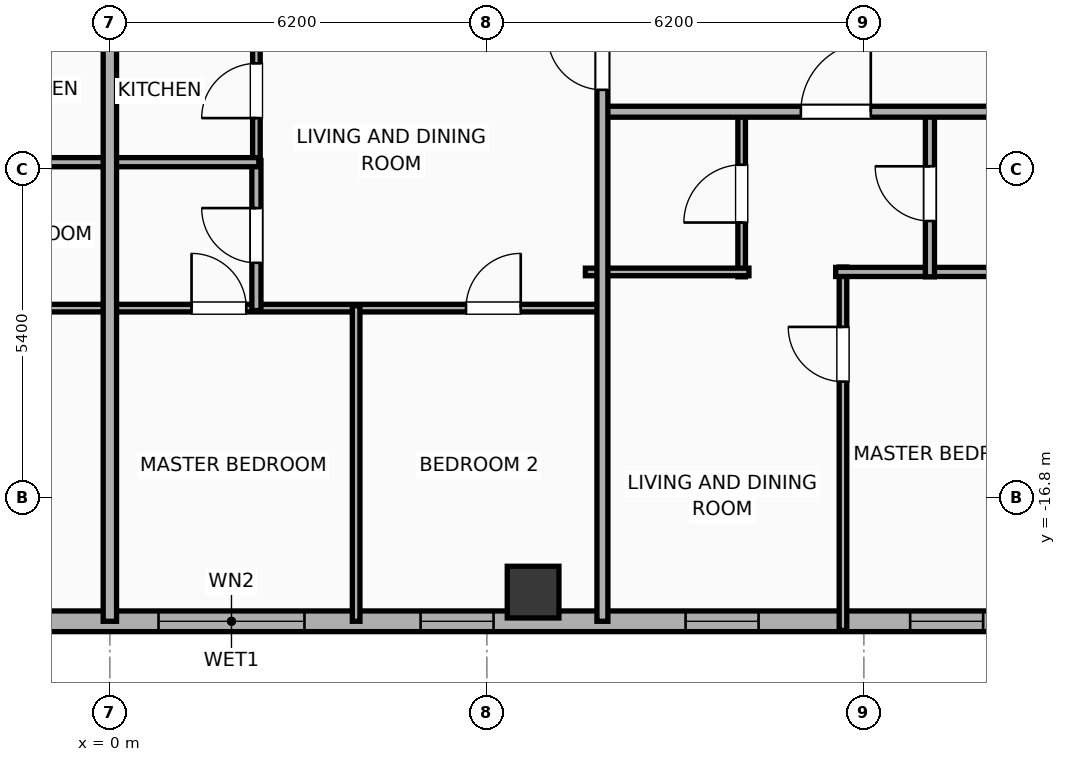
"""IFC4 building model, lengths in metres.
Left out: names, types, materials, properties, quantities, classifications, styles, units other than length and angle.
Written with IfcOpenShell. Run it as: python <this file> out.ifc"""

import sys

from ifc_helpers import new_model, si_unit, direction, frame, frame_2d, origin, origin_2d, place, context, subcontext, project, spatial, rectangle, hollow_rectangle, extrude, element, fill, save


model = new_model("IFC4")
c1 = context("Model", 3, precision=1e-05, world=origin(), true_north=direction((0.0, 1.0)))
c2 = subcontext(c1, "Body", "Model", "MODEL_VIEW")
j1 = project(units=[si_unit("LENGTHUNIT", "METRE"), si_unit("PLANEANGLEUNIT", "RADIAN")], contexts=[c1])
p1 = place(None, origin())
s1 = spatial("IfcSite", under=j1, at=p1, CompositionType="ELEMENT")
p2 = place(p1, origin())
s2 = spatial("IfcBuilding", under=s1, at=p2, CompositionType="ELEMENT")
p3 = place(p2, frame((0.0, 0.0, 239.2)))
s3 = spatial("IfcBuildingStorey", under=s2, at=p3, CompositionType="ELEMENT", Elevation=239.2)
p4 = place(p3, frame((6.96, -18.35, 0.0), z_axis=(0.0, 0.0, 1.0), x_axis=(1.0, 0.0, 0.0)))
e1 = element("IfcColumn", 1, at=p4, inside=s3, PredefinedType="COLUMN", context=c2, shape_type="SweptSolid", body=[
    extrude(hollow_rectangle(XDim=0.85, YDim=0.85, WallThickness=0.028, at=origin_2d()), origin(), (0.0, 0.0, 1.0), 3.9),
])
p5 = place(p3, frame((26.783, -18.83, 0.0), z_axis=(0.0, 0.0, 1.0), x_axis=(-1.0, 0.0, 0.0)))
e2 = element("IfcWall", 2, at=p5, inside=s3, PredefinedType="ELEMENTEDWALL", context=c2, shape_type="SweptSolid", body=[
    extrude(rectangle(XDim=49.566, YDim=0.34, at=frame_2d((24.783, 0.0))), origin(), (0.0, 0.0, 1.0), 3.65),
])
p6 = place(p5, frame((23.583, 0.0, 0.75)))
e3 = element("IfcOpeningElement", 3, at=p6, cuts=e2, PredefinedType="OPENING", context=c2, shape_type="SweptSolid", body=[
    extrude(rectangle(XDim=2.4, YDim=2.1, at=frame_2d((1.2, 1.05))), frame((0.0, 0.18, 0.0), z_axis=(0.0, -1.0, 0.0), x_axis=(1.0, 0.0, 0.0)), (0.0, 0.0, 1.0), 0.36),
])
p7 = place(p5, frame((41.756, 0.0, 0.75)))
e4 = element("IfcOpeningElement", 4, at=p7, cuts=e2, PredefinedType="OPENING", context=c2, shape_type="SweptSolid", body=[
    extrude(rectangle(XDim=2.4, YDim=2.1, at=frame_2d((1.2, 1.05))), frame((0.0, 0.18, 0.0), z_axis=(0.0, -1.0, 0.0), x_axis=(1.0, 0.0, 0.0)), (0.0, 0.0, 1.0), 0.36),
])
p8 = place(p5, frame((47.222, 0.0, 0.75)))
e5 = element("IfcOpeningElement", 5, at=p8, cuts=e2, PredefinedType="OPENING", context=c2, shape_type="SweptSolid", body=[
    extrude(rectangle(XDim=1.2, YDim=2.05, at=frame_2d((0.6, 1.025))), frame((0.0, 0.18, 0.0), z_axis=(0.0, -1.0, 0.0), x_axis=(1.0, 0.0, 0.0)), (0.0, 0.0, 1.0), 0.36),
])
p9 = place(p5, frame((45.263, 0.0, 0.75)))
e6 = element("IfcOpeningElement", 6, at=p9, cuts=e2, PredefinedType="OPENING", context=c2, shape_type="SweptSolid", body=[
    extrude(rectangle(XDim=1.2, YDim=2.05, at=frame_2d((0.6, 1.025))), frame((0.0, 0.18, 0.0), z_axis=(0.0, -1.0, 0.0), x_axis=(1.0, 0.0, 0.0)), (0.0, 0.0, 1.0), 0.36),
])
p10 = place(p5, frame((37.289, 0.0, 0.75)))
e7 = element("IfcOpeningElement", 7, at=p10, cuts=e2, PredefinedType="OPENING", context=c2, shape_type="SweptSolid", body=[
    extrude(rectangle(XDim=1.2, YDim=2.05, at=frame_2d((0.6, 1.025))), frame((0.0, 0.18, 0.0), z_axis=(0.0, -1.0, 0.0), x_axis=(1.0, 0.0, 0.0)), (0.0, 0.0, 1.0), 0.36),
])
p11 = place(p5, frame((16.115, 0.0, 0.75)))
e8 = element("IfcOpeningElement", 8, at=p11, cuts=e2, PredefinedType="OPENING", context=c2, shape_type="SweptSolid", body=[
    extrude(rectangle(XDim=1.2, YDim=2.05, at=frame_2d((0.6, 1.025))), frame((0.0, 0.18, 0.0), z_axis=(0.0, -1.0, 0.0), x_axis=(1.0, 0.0, 0.0)), (0.0, 0.0, 1.0), 0.36),
])
p12 = place(p5, frame((12.422, 0.0, 0.75)))
e9 = element("IfcOpeningElement", 9, at=p12, cuts=e2, PredefinedType="OPENING", context=c2, shape_type="SweptSolid", body=[
    extrude(rectangle(XDim=1.2, YDim=2.05, at=frame_2d((0.6, 1.025))), frame((0.0, 0.18, 0.0), z_axis=(0.0, -1.0, 0.0), x_axis=(1.0, 0.0, 0.0)), (0.0, 0.0, 1.0), 0.36),
])
p13 = place(p5, frame((8.01, 0.0, 0.75)))
e10 = element("IfcOpeningElement", 10, at=p13, cuts=e2, PredefinedType="OPENING", context=c2, shape_type="SweptSolid", body=[
    extrude(rectangle(XDim=1.2, YDim=2.05, at=frame_2d((0.6, 1.025))), frame((0.0, 0.18, 0.0), z_axis=(0.0, -1.0, 0.0), x_axis=(1.0, 0.0, 0.0)), (0.0, 0.0, 1.0), 0.36),
])
p14 = place(p5, frame((5.037, 0.0, 0.75)))
e11 = element("IfcOpeningElement", 11, at=p14, cuts=e2, PredefinedType="OPENING", context=c2, shape_type="SweptSolid", body=[
    extrude(rectangle(XDim=1.2, YDim=2.05, at=frame_2d((0.6, 1.025))), frame((0.0, 0.18, 0.0), z_axis=(0.0, -1.0, 0.0), x_axis=(1.0, 0.0, 0.0)), (0.0, 0.0, 1.0), 0.36),
])
p15 = place(p5, frame((1.811, 0.0, 0.75)))
e12 = element("IfcOpeningElement", 12, at=p15, cuts=e2, PredefinedType="OPENING", context=c2, shape_type="SweptSolid", body=[
    extrude(rectangle(XDim=1.2, YDim=2.05, at=frame_2d((0.6, 1.025))), frame((0.0, 0.18, 0.0), z_axis=(0.0, -1.0, 0.0), x_axis=(1.0, 0.0, 0.0)), (0.0, 0.0, 1.0), 0.36),
])
p16 = place(p5, frame((32.253, 0.0, 0.75)))
e13 = element("IfcOpeningElement", 13, at=p16, cuts=e2, PredefinedType="OPENING", context=c2, shape_type="SweptSolid", body=[
    extrude(rectangle(XDim=1.2, YDim=2.05, at=frame_2d((0.6, 1.025))), frame((0.0, 0.18, 0.0), z_axis=(0.0, -1.0, 0.0), x_axis=(1.0, 0.0, 0.0)), (0.0, 0.0, 1.0), 0.36),
])
p17 = place(p5, frame((27.853, 0.0, 0.75)))
e14 = element("IfcOpeningElement", 14, at=p17, cuts=e2, PredefinedType="OPENING", context=c2, shape_type="SweptSolid", body=[
    extrude(rectangle(XDim=1.2, YDim=2.05, at=frame_2d((0.6, 1.025))), frame((0.0, 0.18, 0.0), z_axis=(0.0, -1.0, 0.0), x_axis=(1.0, 0.0, 0.0)), (0.0, 0.0, 1.0), 0.36),
])
p18 = place(p5, frame((20.473, 0.0, 0.75)))
e15 = element("IfcOpeningElement", 15, at=p18, cuts=e2, PredefinedType="OPENING", context=c2, shape_type="SweptSolid", body=[
    extrude(rectangle(XDim=1.2, YDim=2.05, at=frame_2d((0.6, 1.025))), frame((0.0, 0.18, 0.0), z_axis=(0.0, -1.0, 0.0), x_axis=(1.0, 0.0, 0.0)), (0.0, 0.0, 1.0), 0.36),
])
p19 = place(p3, frame((12.056, -18.98, 0.0), z_axis=(0.0, 0.0, 1.0), x_axis=(0.0, 1.0, 0.0)))
e16 = element("IfcWall", 16, at=p19, inside=s3, PredefinedType="PARTITIONING", context=c2, shape_type="SweptSolid", body=[
    extrude(rectangle(XDim=5.975, YDim=0.125, at=frame_2d((2.988, 0.0))), origin(), (0.0, 0.0, 1.0), 3.65),
])
p20 = place(p19, frame((4.091, 0.0, 0.0)))
e17 = element("IfcOpeningElement", 17, at=p20, cuts=e16, PredefinedType="OPENING", context=c2, shape_type="SweptSolid", body=[
    extrude(rectangle(XDim=0.9, YDim=2.05, at=frame_2d((0.45, 1.025))), frame((0.0, 0.073, 0.0), z_axis=(0.0, -1.0, 0.0), x_axis=(1.0, 0.0, 0.0)), (0.0, 0.0, 1.0), 0.145),
])
p21 = place(p3, frame((11.936, -13.085, 0.0), z_axis=(0.0, 0.0, 1.0), x_axis=(1.0, 0.0, 0.0)))
e18 = element("IfcWall", 18, at=p21, inside=s3, PredefinedType="PLUMBINGWALL", context=c2, shape_type="SweptSolid", body=[
    extrude(rectangle(XDim=3.79, YDim=0.15, at=frame_2d((1.895, 0.0))), origin(), (0.0, 0.0, 1.0), 3.65),
])
p22 = place(p3, frame((10.39, -13.165, 0.0), z_axis=(0.0, 0.0, 1.0), x_axis=(0.0, 1.0, 0.0)))
e19 = element("IfcWall", 19, at=p22, inside=s3, PredefinedType="PARTITIONING", context=c2, shape_type="SweptSolid", body=[
    extrude(rectangle(XDim=2.735, YDim=0.125, at=frame_2d((1.368, 0.0))), origin(), (0.0, 0.0, 1.0), 3.65),
])
p23 = place(p22, frame((0.893, 0.0, 0.0)))
e20 = element("IfcOpeningElement", 20, at=p23, cuts=e19, PredefinedType="OPENING", context=c2, shape_type="SweptSolid", body=[
    extrude(rectangle(XDim=0.95, YDim=2.05, at=frame_2d((0.475, 1.025))), frame((0.0, 0.073, 0.0), z_axis=(0.0, -1.0, 0.0), x_axis=(1.0, 0.0, 0.0)), (0.0, 0.0, 1.0), 0.145),
])
p24 = place(p3, frame((7.82, -13.085, 0.0), z_axis=(0.0, 0.0, 1.0), x_axis=(1.0, 0.0, 0.0)))
e21 = element("IfcWall", 21, at=p24, inside=s3, PredefinedType="PARTITIONING", context=c2, shape_type="SweptSolid", body=[
    extrude(rectangle(XDim=2.69, YDim=0.125, at=frame_2d((1.345, 0.0))), origin(), (0.0, 0.0, 1.0), 3.65),
])
p25 = place(p3, frame((13.486, -13.165, 0.0), z_axis=(0.0, 0.0, 1.0), x_axis=(0.0, 1.0, 0.0)))
e22 = element("IfcWall", 22, at=p25, inside=s3, PredefinedType="PLUMBINGWALL", context=c2, shape_type="SweptSolid", body=[
    extrude(rectangle(XDim=2.735, YDim=0.15, at=frame_2d((1.368, 0.0))), origin(), (0.0, 0.0, 1.0), 3.65),
])
p26 = place(p25, frame((0.917, 0.0, 0.0)))
e23 = element("IfcOpeningElement", 23, at=p26, cuts=e22, PredefinedType="OPENING", context=c2, shape_type="SweptSolid", body=[
    extrude(rectangle(XDim=0.9, YDim=2.05, at=frame_2d((0.45, 1.025))), frame((0.0, 0.085, 0.0), z_axis=(0.0, -1.0, 0.0), x_axis=(1.0, 0.0, 0.0)), (0.0, 0.0, 1.0), 0.17),
])
p27 = place(p3, frame((8.08, -10.45, 0.0), z_axis=(0.0, 0.0, 1.0), x_axis=(1.0, 0.0, 0.0)))
e24 = element("IfcWall", 24, at=p27, inside=s3, PredefinedType="PARTITIONING", context=c2, shape_type="SweptSolid", body=[
    extrude(rectangle(XDim=22.15, YDim=0.18, at=frame_2d((11.075, 0.0))), origin(), (0.0, 0.0, 1.0), 3.65),
])
p28 = place(p27, frame((3.283, 0.0, 0.0)))
e25 = element("IfcOpeningElement", 25, at=p28, cuts=e24, PredefinedType="OPENING", context=c2, shape_type="SweptSolid", body=[
    extrude(rectangle(XDim=1.15, YDim=2.05, at=frame_2d((0.575, 1.025))), frame((0.0, 0.1, 0.0), z_axis=(0.0, -1.0, 0.0), x_axis=(1.0, 0.0, 0.0)), (0.0, 0.0, 1.0), 0.2),
])
p29 = place(p27, frame((10.668, 0.0, 0.0)))
e26 = element("IfcOpeningElement", 26, at=p29, cuts=e24, PredefinedType="OPENING", context=c2, shape_type="SweptSolid", body=[
    extrude(rectangle(XDim=1.15, YDim=2.05, at=frame_2d((0.575, 1.025))), frame((0.0, 0.1, 0.0), z_axis=(0.0, -1.0, 0.0), x_axis=(1.0, 0.0, 0.0)), (0.0, 0.0, 1.0), 0.2),
])
p30 = place(p27, frame((18.084, 0.0, 0.0)))
e27 = element("IfcOpeningElement", 27, at=p30, cuts=e24, PredefinedType="OPENING", context=c2, shape_type="SweptSolid", body=[
    extrude(rectangle(XDim=1.15, YDim=2.05, at=frame_2d((0.575, 1.025))), frame((0.0, 0.1, 0.0), z_axis=(0.0, -1.0, 0.0), x_axis=(1.0, 0.0, 0.0)), (0.0, 0.0, 1.0), 0.2),
])
p31 = place(p3, frame((-8.08, -13.68, 0.0), z_axis=(0.0, 0.0, 1.0), x_axis=(1.0, 0.0, 0.0)))
e28 = element("IfcWall", 28, at=p31, inside=s3, PredefinedType="PARTITIONING", context=c2, shape_type="SweptSolid", body=[
    extrude(rectangle(XDim=8.06, YDim=0.125, at=frame_2d((4.03, 0.0))), origin(), (0.0, 0.0, 1.0), 3.65),
])
p32 = place(p31, frame((1.323, 0.0, 0.0)))
e29 = element("IfcOpeningElement", 29, at=p32, cuts=e28, PredefinedType="OPENING", context=c2, shape_type="SweptSolid", body=[
    extrude(rectangle(XDim=0.9, YDim=2.05, at=frame_2d((0.45, 1.025))), frame((0.0, 0.073, 0.0), z_axis=(0.0, -1.0, 0.0), x_axis=(1.0, 0.0, 0.0)), (0.0, 0.0, 1.0), 0.145),
])
p33 = place(p31, frame((4.547, 0.0, 0.0)))
e30 = element("IfcOpeningElement", 30, at=p33, cuts=e28, PredefinedType="OPENING", context=c2, shape_type="SweptSolid", body=[
    extrude(rectangle(XDim=0.9, YDim=2.05, at=frame_2d((0.45, 1.025))), frame((0.0, 0.073, 0.0), z_axis=(0.0, -1.0, 0.0), x_axis=(1.0, 0.0, 0.0)), (0.0, 0.0, 1.0), 0.145),
])
p34 = place(p3, frame((-2.45, -11.28, 0.0), z_axis=(0.0, 0.0, 1.0), x_axis=(1.0, 0.0, 0.0)))
e31 = element("IfcWall", 31, at=p34, inside=s3, PredefinedType="PLUMBINGWALL", context=c2, shape_type="SweptSolid", body=[
    extrude(rectangle(XDim=2.43, YDim=0.15, at=frame_2d((1.215, 0.0))), origin(), (0.0, 0.0, 1.0), 3.65),
])
p35 = place(p3, frame((0.02, -13.68, 0.0), z_axis=(0.0, 0.0, 1.0), x_axis=(1.0, 0.0, 0.0)))
e32 = element("IfcWall", 32, at=p35, inside=s3, PredefinedType="PARTITIONING", context=c2, shape_type="SweptSolid", body=[
    extrude(rectangle(XDim=8.06, YDim=0.125, at=frame_2d((4.03, 0.0))), origin(), (0.0, 0.0, 1.0), 3.65),
])
p36 = place(p35, frame((1.323, 0.0, 0.0)))
e33 = element("IfcOpeningElement", 33, at=p36, cuts=e32, PredefinedType="OPENING", context=c2, shape_type="SweptSolid", body=[
    extrude(rectangle(XDim=0.9, YDim=2.05, at=frame_2d((0.45, 1.025))), frame((0.0, 0.073, 0.0), z_axis=(0.0, -1.0, 0.0), x_axis=(1.0, 0.0, 0.0)), (0.0, 0.0, 1.0), 0.145),
])
p37 = place(p35, frame((5.837, 0.0, 0.0)))
e34 = element("IfcOpeningElement", 34, at=p37, cuts=e32, PredefinedType="OPENING", context=c2, shape_type="SweptSolid", body=[
    extrude(rectangle(XDim=0.9, YDim=2.05, at=frame_2d((0.45, 1.025))), frame((0.0, 0.073, 0.0), z_axis=(0.0, -1.0, 0.0), x_axis=(1.0, 0.0, 0.0)), (0.0, 0.0, 1.0), 0.145),
])
p38 = place(p3, frame((2.41, -11.31, 0.0), z_axis=(0.0, 0.0, 1.0), x_axis=(0.0, 1.0, 0.0)))
e35 = element("IfcWall", 35, at=p38, inside=s3, PredefinedType="PARTITIONING", context=c2, shape_type="SweptSolid", body=[
    extrude(rectangle(XDim=2.41, YDim=0.125, at=frame_2d((1.205, 0.0))), origin(), (0.0, 0.0, 1.0), 3.65),
])
p39 = place(p38, frame((0.755, 0.0, 0.0)))
e36 = element("IfcOpeningElement", 36, at=p39, cuts=e35, PredefinedType="OPENING", context=c2, shape_type="SweptSolid", body=[
    extrude(rectangle(XDim=0.9, YDim=2.05, at=frame_2d((0.45, 1.025))), frame((0.0, 0.073, 0.0), z_axis=(0.0, -1.0, 0.0), x_axis=(1.0, 0.0, 0.0)), (0.0, 0.0, 1.0), 0.145),
])
p40 = place(p3, frame((2.41, -13.72, 0.0), z_axis=(0.0, 0.0, 1.0), x_axis=(0.0, 1.0, 0.0)))
e37 = element("IfcWall", 37, at=p40, inside=s3, PredefinedType="PLUMBINGWALL", context=c2, shape_type="SweptSolid", body=[
    extrude(rectangle(XDim=2.47, YDim=0.15, at=frame_2d((1.235, 0.0))), origin(), (0.0, 0.0, 1.0), 3.65),
])
p41 = place(p40, frame((0.785, 0.0, 0.0)))
e38 = element("IfcOpeningElement", 38, at=p41, cuts=e37, PredefinedType="OPENING", context=c2, shape_type="SweptSolid", body=[
    extrude(rectangle(XDim=0.9, YDim=2.05, at=frame_2d((0.45, 1.025))), frame((0.0, 0.085, 0.0), z_axis=(0.0, -1.0, 0.0), x_axis=(1.0, 0.0, 0.0)), (0.0, 0.0, 1.0), 0.17),
])
p42 = place(p3, frame((0.02, -11.28, 0.0), z_axis=(0.0, 0.0, 1.0), x_axis=(1.0, 0.0, 0.0)))
e39 = element("IfcWall", 39, at=p42, inside=s3, PredefinedType="PLUMBINGWALL", context=c2, shape_type="SweptSolid", body=[
    extrude(rectangle(XDim=2.43, YDim=0.15, at=frame_2d((1.215, 0.0))), origin(), (0.0, 0.0, 1.0), 3.65),
])
p43 = place(p3, frame((4.05, -18.83, 0.0), z_axis=(0.0, 0.0, 1.0), x_axis=(0.0, 1.0, 0.0)))
e40 = element("IfcWall", 40, at=p43, inside=s3, PredefinedType="PARTITIONING", context=c2, shape_type="SweptSolid", body=[
    extrude(rectangle(XDim=5.19, YDim=0.125, at=frame_2d((2.595, 0.0))), origin(), (0.0, 0.0, 1.0), 3.65),
])
p44 = place(p3, frame((8.1, -18.83, 0.0), z_axis=(0.0, 0.0, 1.0), x_axis=(0.0, 1.0, 0.0)))
e41 = element("IfcWall", 41, at=p44, inside=s3, PredefinedType="PARTITIONING", context=c2, shape_type="SweptSolid", body=[
    extrude(rectangle(XDim=9.99, YDim=0.18, at=frame_2d((4.995, 0.0))), origin(), (0.0, 0.0, 1.0), 3.65),
])
p45 = place(p44, frame((8.74, 0.0, 0.0)))
e42 = element("IfcOpeningElement", 42, at=p45, cuts=e41, PredefinedType="OPENING", context=c2, shape_type="SweptSolid", body=[
    extrude(rectangle(XDim=0.9, YDim=2.05, at=frame_2d((0.45, 1.025))), frame((0.0, 0.1, 0.0), z_axis=(0.0, -1.0, 0.0), x_axis=(1.0, 0.0, 0.0)), (0.0, 0.0, 1.0), 0.2),
])
p46 = place(p3, frame((0.0, -18.83, 0.0), z_axis=(0.0, 0.0, 1.0), x_axis=(0.0, 1.0, 0.0)))
e43 = element("IfcWall", 43, at=p46, inside=s3, PredefinedType="PARTITIONING", context=c2, shape_type="SweptSolid", body=[
    extrude(rectangle(XDim=9.99, YDim=0.22, at=frame_2d((4.995, 0.0))), origin(), (0.0, 0.0, 1.0), 3.65),
])
p47 = place(p6, origin())
e44 = element("IfcWindow", 44, at=p47, inside=s3, PartitioningType="SINGLE_PANEL", PredefinedType="WINDOW", context=c2, shape_type="SweptSolid", body=[
    extrude(rectangle(XDim=2.4, YDim=2.1, at=frame_2d((1.2, 1.05))), frame((0.0, 0.03, 0.0), z_axis=(0.0, -1.0, 0.0), x_axis=(1.0, 0.0, 0.0)), (0.0, 0.0, 1.0), 0.06),
])
fill(e3, e44)
p48 = place(p11, origin())
e45 = element("IfcWindow", 45, at=p48, inside=s3, PartitioningType="SINGLE_PANEL", PredefinedType="WINDOW", context=c2, shape_type="SweptSolid", body=[
    extrude(rectangle(XDim=1.2, YDim=2.05, at=frame_2d((0.6, 1.025))), frame((0.0, 0.03, 0.0), z_axis=(0.0, -1.0, 0.0), x_axis=(1.0, 0.0, 0.0)), (0.0, 0.0, 1.0), 0.06),
])
fill(e8, e45)
p49 = place(p12, origin())
e46 = element("IfcWindow", 46, at=p49, inside=s3, PartitioningType="SINGLE_PANEL", PredefinedType="WINDOW", context=c2, shape_type="SweptSolid", body=[
    extrude(rectangle(XDim=1.2, YDim=2.05, at=frame_2d((0.6, 1.025))), frame((0.0, 0.03, 0.0), z_axis=(0.0, -1.0, 0.0), x_axis=(1.0, 0.0, 0.0)), (0.0, 0.0, 1.0), 0.06),
])
fill(e9, e46)
p50 = place(p18, origin())
e47 = element("IfcWindow", 47, at=p50, inside=s3, PartitioningType="SINGLE_PANEL", PredefinedType="WINDOW", context=c2, shape_type="SweptSolid", body=[
    extrude(rectangle(XDim=1.2, YDim=2.05, at=frame_2d((0.6, 1.025))), frame((0.0, 0.03, 0.0), z_axis=(0.0, -1.0, 0.0), x_axis=(1.0, 0.0, 0.0)), (0.0, 0.0, 1.0), 0.06),
])
fill(e15, e47)
p51 = place(p20, origin())
e48 = element("IfcDoor", 48, at=p51, inside=s3, OperationType="SINGLE_SWING_RIGHT", PredefinedType="DOOR", context=c2, shape_type="SweptSolid", body=[
    extrude(rectangle(XDim=0.9, YDim=2.05, at=frame_2d((0.45, 1.025))), frame((0.0, 0.025, 0.0), z_axis=(0.0, -1.0, 0.0), x_axis=(1.0, 0.0, 0.0)), (0.0, 0.0, 1.0), 0.05),
])
fill(e17, e48)
p52 = place(p23, origin())
e49 = element("IfcDoor", 49, at=p52, inside=s3, OperationType="SINGLE_SWING_LEFT", PredefinedType="DOOR", context=c2, shape_type="SweptSolid", body=[
    extrude(rectangle(XDim=0.95, YDim=2.05, at=frame_2d((0.475, 1.025))), frame((0.0, 0.025, 0.0), z_axis=(0.0, -1.0, 0.0), x_axis=(1.0, 0.0, 0.0)), (0.0, 0.0, 1.0), 0.05),
])
fill(e20, e49)
p53 = place(p26, origin())
e50 = element("IfcDoor", 50, at=p53, inside=s3, OperationType="SINGLE_SWING_RIGHT", PredefinedType="DOOR", context=c2, shape_type="SweptSolid", body=[
    extrude(rectangle(XDim=0.9, YDim=2.05, at=frame_2d((0.45, 1.025))), frame((0.0, 0.025, 0.0), z_axis=(0.0, -1.0, 0.0), x_axis=(1.0, 0.0, 0.0)), (0.0, 0.0, 1.0), 0.05),
])
fill(e23, e50)
p54 = place(p28, origin())
e51 = element("IfcDoor", 51, at=p54, inside=s3, OperationType="SINGLE_SWING_RIGHT", PredefinedType="DOOR", context=c2, shape_type="SweptSolid", body=[
    extrude(rectangle(XDim=1.15, YDim=2.05, at=frame_2d((0.575, 1.025))), frame((0.0, 0.025, 0.0), z_axis=(0.0, -1.0, 0.0), x_axis=(1.0, 0.0, 0.0)), (0.0, 0.0, 1.0), 0.05),
])
fill(e25, e51)
p55 = place(p36, origin())
e52 = element("IfcDoor", 52, at=p55, inside=s3, OperationType="SINGLE_SWING_LEFT", PredefinedType="DOOR", context=c2, shape_type="SweptSolid", body=[
    extrude(rectangle(XDim=0.9, YDim=2.05, at=frame_2d((0.45, 1.025))), frame((0.0, 0.025, 0.0), z_axis=(0.0, -1.0, 0.0), x_axis=(1.0, 0.0, 0.0)), (0.0, 0.0, 1.0), 0.05),
])
fill(e33, e52)
p56 = place(p37, origin())
e53 = element("IfcDoor", 53, at=p56, inside=s3, OperationType="SINGLE_SWING_RIGHT", PredefinedType="DOOR", context=c2, shape_type="SweptSolid", body=[
    extrude(rectangle(XDim=0.9, YDim=2.05, at=frame_2d((0.45, 1.025))), frame((0.0, 0.025, 0.0), z_axis=(0.0, -1.0, 0.0), x_axis=(1.0, 0.0, 0.0)), (0.0, 0.0, 1.0), 0.05),
])
fill(e34, e53)
p57 = place(p39, origin())
e54 = element("IfcDoor", 54, at=p57, inside=s3, OperationType="SINGLE_SWING_LEFT", PredefinedType="DOOR", context=c2, shape_type="SweptSolid", body=[
    extrude(rectangle(XDim=0.9, YDim=2.05, at=frame_2d((0.45, 1.025))), frame((0.0, 0.025, 0.0), z_axis=(0.0, -1.0, 0.0), x_axis=(1.0, 0.0, 0.0)), (0.0, 0.0, 1.0), 0.05),
])
fill(e36, e54)
p58 = place(p41, origin())
e55 = element("IfcDoor", 55, at=p58, inside=s3, OperationType="SINGLE_SWING_RIGHT", PredefinedType="DOOR", context=c2, shape_type="SweptSolid", body=[
    extrude(rectangle(XDim=0.9, YDim=2.05, at=frame_2d((0.45, 1.025))), frame((0.0, 0.025, 0.0), z_axis=(0.0, -1.0, 0.0), x_axis=(1.0, 0.0, 0.0)), (0.0, 0.0, 1.0), 0.05),
])
fill(e38, e55)
p59 = place(p45, origin())
e56 = element("IfcDoor", 56, at=p59, inside=s3, OperationType="SINGLE_SWING_RIGHT", PredefinedType="DOOR", context=c2, shape_type="SweptSolid", body=[
    extrude(rectangle(XDim=0.9, YDim=2.05, at=frame_2d((0.45, 1.025))), frame((0.0, 0.025, 0.0), z_axis=(0.0, -1.0, 0.0), x_axis=(1.0, 0.0, 0.0)), (0.0, 0.0, 1.0), 0.05),
])
fill(e42, e56)
save(model, sys.argv[1])
